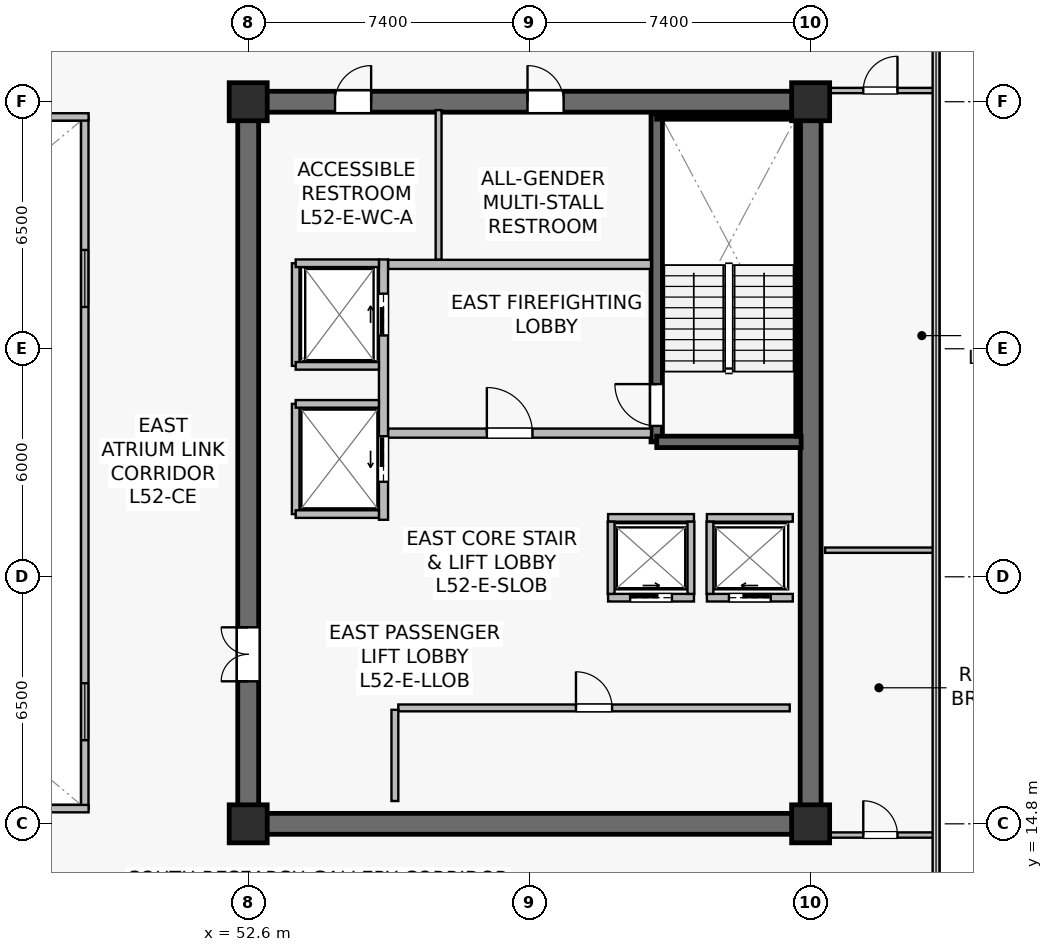
"""IFC4 building model, lengths in metres.
Left out: names, types, materials, properties, quantities, classifications, styles, units other than length and angle.
Written with IfcOpenShell. Run it as: python <this file> out.ifc"""

import sys

from ifc_helpers import new_model, si_unit, direction, frame, frame_2d, origin, origin_2d, place, context, subcontext, project, spatial, rectangle, extrude, source, transform, mapped, element, fill, save


model = new_model("IFC4")
c1 = context("Model", 3, precision=1e-05, world=origin(), true_north=direction((0.0, 1.0)))
c2 = subcontext(c1, "Body", "Model", "MODEL_VIEW")
j1 = project(units=[si_unit("LENGTHUNIT", "METRE"), si_unit("PLANEANGLEUNIT", "RADIAN")], contexts=[c1])
p1 = place(None, origin())
s1 = spatial("IfcSite", under=j1, at=p1, CompositionType="ELEMENT")
p2 = place(p1, origin())
s2 = spatial("IfcBuilding", under=s1, at=p2, CompositionType="ELEMENT")
p3 = place(p2, frame((0.0, 0.0, 217.8)))
s3 = spatial("IfcBuildingStorey", under=s2, at=p3, CompositionType="ELEMENT", Elevation=217.8)
p4 = place(p3, frame((52.325, 14.8, 0.0), z_axis=(0.0, 0.0, 1.0), x_axis=(1.0, 0.0, 0.0)))
e1 = element("IfcWall", 1, at=p4, inside=s3, PredefinedType="SHEAR", context=c2, shape_type="SweptSolid", body=[
    extrude(rectangle(XDim=15.35, YDim=0.55, at=frame_2d((7.675, 0.0))), origin(), (0.0, 0.0, 1.0), 3.8),
])
p5 = place(p3, frame((52.325, 33.8, 0.0), z_axis=(0.0, 0.0, 1.0), x_axis=(1.0, 0.0, 0.0)))
e2 = element("IfcWall", 2, at=p5, inside=s3, PredefinedType="SHEAR", context=c2, shape_type="SweptSolid", body=[
    extrude(rectangle(XDim=15.35, YDim=0.55, at=frame_2d((7.675, 0.0))), origin(), (0.0, 0.0, 1.0), 3.8),
])
p6 = place(p5, frame((7.625, 0.0, 0.0)))
e3 = element("IfcOpeningElement", 3, at=p6, cuts=e2, PredefinedType="OPENING", context=c2, shape_type="SweptSolid", body=[
    extrude(rectangle(XDim=0.95, YDim=2.15, at=frame_2d((0.475, 1.075))), frame((0.0, 0.285, 0.0), z_axis=(0.0, -1.0, 0.0), x_axis=(1.0, 0.0, 0.0)), (0.0, 0.0, 1.0), 0.57),
])
p7 = place(p5, frame((2.56, 0.0, 0.0)))
e4 = element("IfcOpeningElement", 4, at=p7, cuts=e2, PredefinedType="OPENING", context=c2, shape_type="SweptSolid", body=[
    extrude(rectangle(XDim=0.95, YDim=2.15, at=frame_2d((0.475, 1.075))), frame((0.0, 0.285, 0.0), z_axis=(0.0, -1.0, 0.0), x_axis=(1.0, 0.0, 0.0)), (0.0, 0.0, 1.0), 0.57),
])
p8 = place(p3, frame((52.6, 15.075, 0.0), z_axis=(0.0, 0.0, 1.0), x_axis=(0.0, 1.0, 0.0)))
e5 = element("IfcWall", 5, at=p8, inside=s3, PredefinedType="SHEAR", context=c2, shape_type="SweptSolid", body=[
    extrude(rectangle(XDim=18.45, YDim=0.55, at=frame_2d((9.225, 0.0))), origin(), (0.0, 0.0, 1.0), 3.8),
])
p9 = place(p8, frame((3.475, 0.0, 0.0)))
e6 = element("IfcOpeningElement", 6, at=p9, cuts=e5, PredefinedType="OPENING", context=c2, shape_type="SweptSolid", body=[
    extrude(rectangle(XDim=1.42, YDim=2.2, at=frame_2d((0.71, 1.1))), frame((0.0, 0.285, 0.0), z_axis=(0.0, -1.0, 0.0), x_axis=(1.0, 0.0, 0.0)), (0.0, 0.0, 1.0), 0.57),
])
p10 = place(p3, frame((67.4, 15.075, 0.0), z_axis=(0.0, 0.0, 1.0), x_axis=(0.0, 1.0, 0.0)))
e7 = element("IfcWall", 7, at=p10, inside=s3, PredefinedType="SHEAR", context=c2, shape_type="SweptSolid", body=[
    extrude(rectangle(XDim=18.45, YDim=0.55, at=frame_2d((9.225, 0.0))), origin(), (0.0, 0.0, 1.0), 3.8),
])
p11 = place(p3, frame((63.35, 24.85, 0.0), z_axis=(0.0, 0.0, 1.0), x_axis=(0.0, 1.0, 0.0)))
e8 = element("IfcWall", 8, at=p11, inside=s3, PredefinedType="SHEAR", context=c2, shape_type="SweptSolid", body=[
    extrude(rectangle(XDim=8.63, YDim=0.3, at=frame_2d((4.315, 0.0))), origin(), (0.0, 0.0, 1.0), 3.8),
])
p12 = place(p11, frame((0.42, 0.0, 0.0)))
e9 = element("IfcOpeningElement", 9, at=p12, cuts=e8, PredefinedType="OPENING", context=c2, shape_type="SweptSolid", body=[
    extrude(rectangle(XDim=1.1, YDim=2.15, at=frame_2d((0.55, 1.075))), frame((0.0, 0.16, 0.0), z_axis=(0.0, -1.0, 0.0), x_axis=(1.0, 0.0, 0.0)), (0.0, 0.0, 1.0), 0.32),
])
p13 = place(p3, frame((63.35, 24.85, 0.0), z_axis=(0.0, 0.0, 1.0), x_axis=(1.0, 0.0, 0.0)))
e10 = element("IfcWall", 10, at=p13, inside=s3, PredefinedType="SHEAR", context=c2, shape_type="SweptSolid", body=[
    extrude(rectangle(XDim=3.8, YDim=0.3, at=frame_2d((1.9, 0.0))), origin(), (0.0, 0.0, 1.0), 3.8),
])
p14 = place(p3, frame((63.35, 33.4, 0.0), z_axis=(0.0, 0.0, 1.0), x_axis=(1.0, 0.0, 0.0)))
e11 = element("IfcWall", 11, at=p14, inside=s3, PredefinedType="SOLIDWALL", context=c2, shape_type="SweptSolid", body=[
    extrude(rectangle(XDim=3.72, YDim=0.12, at=frame_2d((1.86, 0.0))), origin(), (0.0, 0.0, 1.0), 3.8),
])
p15 = place(p3, frame((67.07, 25.0, 0.0), z_axis=(0.0, 0.0, 1.0), x_axis=(0.0, 1.0, 0.0)))
e12 = element("IfcWall", 12, at=p15, inside=s3, PredefinedType="SOLIDWALL", context=c2, shape_type="SweptSolid", body=[
    extrude(rectangle(XDim=8.32, YDim=0.12, at=frame_2d((4.16, 0.0))), origin(), (0.0, 0.0, 1.0), 3.8),
])
m1 = source(origin(), c2, "Body", "SweptSolid", [
    extrude(rectangle(XDim=1.0, YDim=1.0, at=origin_2d()), origin(), (0.0, 0.0, 1.0), 4.1),
])
for number, where, z_axis, x_axis in (
    (13, (52.6, 14.8, 0.0), (0.0, 0.0, 1.0), (1.0, 0.0, 0.0)),
    (14, (67.4, 14.8, 0.0), (0.0, 0.0, 1.0), (1.0, 0.0, 0.0)),
    (15, (52.6, 33.8, 0.0), (0.0, 0.0, 1.0), (1.0, 0.0, 0.0)),
    (16, (67.4, 33.8, 0.0), (0.0, 0.0, 1.0), (1.0, 0.0, 0.0)),
):
    element("IfcColumn", number, at=place(p3, frame(where, z_axis=z_axis, x_axis=x_axis)), inside=s3, PredefinedType="COLUMN", context=c2, shape_type="MappedRepresentation", body=[
        mapped(m1, transform((0.0, 0.0, 0.0), scale=1.0)),
    ])
p16 = place(p3, frame((56.28, 25.08, 0.0), z_axis=(0.0, 0.0, 1.0), x_axis=(1.0, 0.0, 0.0)))
e17 = element("IfcWall", 17, at=p16, inside=s3, PredefinedType="SOLIDWALL", context=c2, shape_type="SweptSolid", body=[
    extrude(rectangle(XDim=6.92, YDim=0.24, at=frame_2d((3.46, 0.0))), origin(), (0.0, 0.0, 1.0), 3.197),
])
p17 = place(p16, frame((2.6, 0.0, 0.0)))
e18 = element("IfcOpeningElement", 18, at=p17, cuts=e17, PredefinedType="OPENING", context=c2, shape_type="SweptSolid", body=[
    extrude(rectangle(XDim=1.2, YDim=2.16, at=frame_2d((0.6, 1.08))), frame((0.0, 0.13, 0.0), z_axis=(0.0, -1.0, 0.0), x_axis=(1.0, 0.0, 0.0)), (0.0, 0.0, 1.0), 0.26),
])
p18 = place(p3, frame((56.28, 29.52, 0.0), z_axis=(0.0, 0.0, 1.0), x_axis=(1.0, 0.0, 0.0)))
e19 = element("IfcWall", 19, at=p18, inside=s3, PredefinedType="SOLIDWALL", context=c2, shape_type="SweptSolid", body=[
    extrude(rectangle(XDim=6.92, YDim=0.24, at=frame_2d((3.46, 0.0))), origin(), (0.0, 0.0, 1.0), 3.197),
])
p19 = place(p3, frame((56.16, 22.8, 0.0), z_axis=(0.0, 0.0, 1.0), x_axis=(0.0, 1.0, 0.0)))
e20 = element("IfcWall", 20, at=p19, inside=s3, PredefinedType="SOLIDWALL", context=c2, shape_type="SweptSolid", body=[
    extrude(rectangle(XDim=6.85, YDim=0.24, at=frame_2d((3.425, 0.0))), origin(), (0.0, 0.0, 1.0), 2.935),
])
p20 = place(p19, frame((4.85, 0.0, 0.0)))
e21 = element("IfcOpeningElement", 21, at=p20, cuts=e20, PredefinedType="OPENING", context=c2, shape_type="SweptSolid", body=[
    extrude(rectangle(XDim=1.1, YDim=2.22, at=frame_2d((0.55, 1.11))), frame((0.0, 0.13, 0.0), z_axis=(0.0, -1.0, 0.0), x_axis=(1.0, 0.0, 0.0)), (0.0, 0.0, 1.0), 0.26),
])
p21 = place(p19, frame((1.0, 0.0, 0.0)))
e22 = element("IfcOpeningElement", 22, at=p21, cuts=e20, PredefinedType="OPENING", context=c2, shape_type="SweptSolid", body=[
    extrude(rectangle(XDim=1.2, YDim=2.22, at=frame_2d((0.6, 1.11))), frame((0.0, 0.13, 0.0), z_axis=(0.0, -1.0, 0.0), x_axis=(1.0, 0.0, 0.0)), (0.0, 0.0, 1.0), 0.26),
])
p22 = place(p3, frame((64.67, 20.75, 0.0), z_axis=(0.0, 0.0, 1.0), x_axis=(1.0, 0.0, 0.0)))
e23 = element("IfcWall", 23, at=p22, inside=s3, PredefinedType="SOLIDWALL", context=c2, shape_type="SweptSolid", body=[
    extrude(rectangle(XDim=2.26, YDim=0.2, at=frame_2d((1.13, 0.0))), origin(), (0.0, 0.0, 1.0), 3.8),
])
p23 = place(p22, frame((0.58, 0.0, 0.0)))
e24 = element("IfcOpeningElement", 24, at=p23, cuts=e23, PredefinedType="OPENING", context=c2, shape_type="SweptSolid", body=[
    extrude(rectangle(XDim=1.1, YDim=2.22, at=frame_2d((0.55, 1.11))), frame((0.0, 0.11, 0.0), z_axis=(0.0, -1.0, 0.0), x_axis=(1.0, 0.0, 0.0)), (0.0, 0.0, 1.0), 0.22),
])
p24 = place(p3, frame((64.67, 22.85, 0.0), z_axis=(0.0, 0.0, 1.0), x_axis=(1.0, 0.0, 0.0)))
e25 = element("IfcWall", 25, at=p24, inside=s3, PredefinedType="SOLIDWALL", context=c2, shape_type="SweptSolid", body=[
    extrude(rectangle(XDim=2.26, YDim=0.2, at=frame_2d((1.13, 0.0))), origin(), (0.0, 0.0, 1.0), 3.8),
])
p25 = place(p3, frame((64.75, 20.85, 0.0), z_axis=(0.0, 0.0, 1.0), x_axis=(0.0, 1.0, 0.0)))
e26 = element("IfcWall", 26, at=p25, inside=s3, PredefinedType="SOLIDWALL", context=c2, shape_type="SweptSolid", body=[
    extrude(rectangle(XDim=1.9, YDim=0.18, at=frame_2d((0.95, 0.0))), origin(), (0.0, 0.0, 1.0), 3.8),
])
p26 = place(p3, frame((62.07, 20.75, 0.0), z_axis=(0.0, 0.0, 1.0), x_axis=(1.0, 0.0, 0.0)))
e27 = element("IfcWall", 27, at=p26, inside=s3, PredefinedType="SOLIDWALL", context=c2, shape_type="SweptSolid", body=[
    extrude(rectangle(XDim=2.26, YDim=0.2, at=frame_2d((1.13, 0.0))), origin(), (0.0, 0.0, 1.0), 3.8),
])
p27 = place(p26, frame((0.58, 0.0, 0.0)))
e28 = element("IfcOpeningElement", 28, at=p27, cuts=e27, PredefinedType="OPENING", context=c2, shape_type="SweptSolid", body=[
    extrude(rectangle(XDim=1.1, YDim=2.22, at=frame_2d((0.55, 1.11))), frame((0.0, 0.11, 0.0), z_axis=(0.0, -1.0, 0.0), x_axis=(1.0, 0.0, 0.0)), (0.0, 0.0, 1.0), 0.22),
])
p28 = place(p3, frame((62.07, 22.85, 0.0), z_axis=(0.0, 0.0, 1.0), x_axis=(1.0, 0.0, 0.0)))
e29 = element("IfcWall", 29, at=p28, inside=s3, PredefinedType="SOLIDWALL", context=c2, shape_type="SweptSolid", body=[
    extrude(rectangle(XDim=2.26, YDim=0.2, at=frame_2d((1.13, 0.0))), origin(), (0.0, 0.0, 1.0), 3.8),
])
for number, where, z_axis, x_axis in (
    (30, (62.15, 20.85, 0.0), (0.0, 0.0, 1.0), (0.0, 1.0, 0.0)),
    (31, (64.25, 20.85, 0.0), (0.0, 0.0, 1.0), (0.0, 1.0, 0.0)),
):
    element("IfcWall", number, at=place(p3, frame(where, z_axis=z_axis, x_axis=x_axis)), inside=s3, PredefinedType="SOLIDWALL", context=c2, shape_type="SweptSolid", body=[
        extrude(rectangle(XDim=1.9, YDim=0.18, at=frame_2d((0.95, 0.0))), origin(), (0.0, 0.0, 1.0), 3.8),
    ])
p29 = place(p3, frame((53.85, 26.85, 0.0), z_axis=(0.0, 0.0, 1.0), x_axis=(0.0, 1.0, 0.0)))
e32 = element("IfcWall", 32, at=p29, inside=s3, PredefinedType="SOLIDWALL", context=c2, shape_type="SweptSolid", body=[
    extrude(rectangle(XDim=2.7, YDim=0.2, at=frame_2d((1.35, 0.0))), origin(), (0.0, 0.0, 1.0), 3.8),
])
p30 = place(p3, frame((53.85, 29.55, 0.0), z_axis=(0.0, 0.0, 1.0), x_axis=(1.0, 0.0, 0.0)))
e33 = element("IfcWall", 33, at=p30, inside=s3, PredefinedType="SOLIDWALL", context=c2, shape_type="SweptSolid", body=[
    extrude(rectangle(XDim=2.19, YDim=0.2, at=frame_2d((1.095, 0.0))), origin(), (0.0, 0.0, 1.0), 3.8),
])
p31 = place(p3, frame((53.85, 26.85, 0.0), z_axis=(0.0, 0.0, 1.0), x_axis=(1.0, 0.0, 0.0)))
e34 = element("IfcWall", 34, at=p31, inside=s3, PredefinedType="SOLIDWALL", context=c2, shape_type="SweptSolid", body=[
    extrude(rectangle(XDim=2.19, YDim=0.2, at=frame_2d((1.095, 0.0))), origin(), (0.0, 0.0, 1.0), 3.197),
])
p32 = place(p3, frame((53.85, 22.95, 0.0), z_axis=(0.0, 0.0, 1.0), x_axis=(0.0, 1.0, 0.0)))
e35 = element("IfcWall", 35, at=p32, inside=s3, PredefinedType="SOLIDWALL", context=c2, shape_type="SweptSolid", body=[
    extrude(rectangle(XDim=2.9, YDim=0.2, at=frame_2d((1.45, 0.0))), origin(), (0.0, 0.0, 1.0), 2.935),
])
for number, where, z_axis, x_axis in (
    (36, (53.85, 25.85, 0.0), (0.0, 0.0, 1.0), (1.0, 0.0, 0.0)),
    (37, (53.85, 22.95, 0.0), (0.0, 0.0, 1.0), (1.0, 0.0, 0.0)),
):
    element("IfcWall", number, at=place(p3, frame(where, z_axis=z_axis, x_axis=x_axis)), inside=s3, PredefinedType="SOLIDWALL", context=c2, shape_type="SweptSolid", body=[
        extrude(rectangle(XDim=2.19, YDim=0.2, at=frame_2d((1.095, 0.0))), origin(), (0.0, 0.0, 1.0), 3.8),
    ])
p33 = place(p3, frame((56.55, 17.85, 0.0), z_axis=(0.0, 0.0, 1.0), x_axis=(1.0, 0.0, 0.0)))
e38 = element("IfcWall", 38, at=p33, inside=s3, PredefinedType="SOLIDWALL", context=c2, shape_type="SweptSolid", body=[
    extrude(rectangle(XDim=10.3, YDim=0.18, at=frame_2d((5.15, 0.0))), origin(), (0.0, 0.0, 1.0), 3.197),
])
p34 = place(p33, frame((4.675, 0.0, 0.0)))
e39 = element("IfcOpeningElement", 39, at=p34, cuts=e38, PredefinedType="OPENING", context=c2, shape_type="SweptSolid", body=[
    extrude(rectangle(XDim=0.95, YDim=2.15, at=frame_2d((0.475, 1.075))), frame((0.0, 0.1, 0.0), z_axis=(0.0, -1.0, 0.0), x_axis=(1.0, 0.0, 0.0)), (0.0, 0.0, 1.0), 0.2),
])
p35 = place(p3, frame((56.46, 15.4, 0.0), z_axis=(0.0, 0.0, 1.0), x_axis=(0.0, 1.0, 0.0)))
e40 = element("IfcWall", 40, at=p35, inside=s3, PredefinedType="SOLIDWALL", context=c2, shape_type="SweptSolid", body=[
    extrude(rectangle(XDim=2.4, YDim=0.18, at=frame_2d((1.2, 0.0))), origin(), (0.0, 0.0, 1.0), 3.8),
])
p36 = place(p3, frame((57.61, 29.65, 0.0), z_axis=(0.0, 0.0, 1.0), x_axis=(0.0, 1.0, 0.0)))
e41 = element("IfcWall", 41, at=p36, inside=s3, PredefinedType="PLUMBINGWALL", context=c2, shape_type="SweptSolid", body=[
    extrude(rectangle(XDim=3.93, YDim=0.155, at=frame_2d((1.965, 0.0))), origin(), (0.0, 0.0, 1.0), 3.8),
])
p37 = place(p3, frame((48.3, 15.2, 0.0), z_axis=(0.0, 0.0, 1.0), x_axis=(0.0, 1.0, 0.0)))
e42 = element("IfcWall", 42, at=p37, inside=s3, PredefinedType="SOLIDWALL", context=c2, shape_type="SweptSolid", body=[
    extrude(rectangle(XDim=18.2, YDim=0.195, at=frame_2d((9.1, 0.0))), origin(), (0.0, 0.0, 1.0), 3.8),
])
p38 = place(p37, frame((1.8, 0.0, 0.9)))
e43 = element("IfcOpeningElement", 43, at=p38, cuts=e42, PredefinedType="OPENING", context=c2, shape_type="SweptSolid", body=[
    extrude(rectangle(XDim=1.5, YDim=1.4, at=frame_2d((0.75, 0.7))), frame((0.0, 0.107, 0.0), z_axis=(0.0, -1.0, 0.0), x_axis=(1.0, 0.0, 0.0)), (0.0, 0.0, 1.0), 0.215),
])
p39 = place(p37, frame((13.2, 0.0, 0.9)))
e44 = element("IfcOpeningElement", 44, at=p39, cuts=e42, PredefinedType="OPENING", context=c2, shape_type="SweptSolid", body=[
    extrude(rectangle(XDim=1.5, YDim=1.4, at=frame_2d((0.75, 0.7))), frame((0.0, 0.107, 0.0), z_axis=(0.0, -1.0, 0.0), x_axis=(1.0, 0.0, 0.0)), (0.0, 0.0, 1.0), 0.215),
])
for number, where, z_axis, x_axis in (
    (45, (26.4, 15.2, 0.0), (0.0, 0.0, 1.0), (1.0, 0.0, 0.0)),
    (46, (26.4, 33.4, 0.0), (0.0, 0.0, 1.0), (1.0, 0.0, 0.0)),
):
    element("IfcWall", number, at=place(p3, frame(where, z_axis=z_axis, x_axis=x_axis)), inside=s3, PredefinedType="SOLIDWALL", context=c2, shape_type="SweptSolid", body=[
        extrude(rectangle(XDim=22.0, YDim=0.195, at=frame_2d((11.0, 0.0))), origin(), (0.0, 0.0, 1.0), 3.8),
    ])
p40 = place(p3, frame((67.78, 22.0, 0.0), z_axis=(0.0, 0.0, 1.0), x_axis=(1.0, 0.0, 0.0)))
e47 = element("IfcWall", 47, at=p40, inside=s3, PredefinedType="PARTITIONING", context=c2, shape_type="SweptSolid", body=[
    extrude(rectangle(XDim=2.91, YDim=0.14, at=frame_2d((1.455, 0.0))), origin(), (0.0, 0.0, 1.0), 3.8),
])
p41 = place(p3, frame((67.78, 14.505, 0.0), z_axis=(0.0, 0.0, 1.0), x_axis=(1.0, 0.0, 0.0)))
e48 = element("IfcWall", 48, at=p41, inside=s3, PredefinedType="PARTITIONING", context=c2, shape_type="SweptSolid", body=[
    extrude(rectangle(XDim=2.91, YDim=0.14, at=frame_2d((1.455, 0.0))), origin(), (0.0, 0.0, 1.0), 3.8),
])
p42 = place(p41, frame((1.005, 0.0, 0.0)))
e49 = element("IfcOpeningElement", 49, at=p42, cuts=e48, PredefinedType="OPENING", context=c2, shape_type="SweptSolid", body=[
    extrude(rectangle(XDim=0.9, YDim=2.1, at=frame_2d((0.45, 1.05))), frame((0.0, 0.08, 0.0), z_axis=(0.0, -1.0, 0.0), x_axis=(1.0, 0.0, 0.0)), (0.0, 0.0, 1.0), 0.16),
])
p43 = place(p3, frame((67.78, 34.095, 0.0), z_axis=(0.0, 0.0, 1.0), x_axis=(1.0, 0.0, 0.0)))
e50 = element("IfcWall", 50, at=p43, inside=s3, PredefinedType="PARTITIONING", context=c2, shape_type="SweptSolid", body=[
    extrude(rectangle(XDim=2.91, YDim=0.14, at=frame_2d((1.455, 0.0))), origin(), (0.0, 0.0, 1.0), 3.8),
])
p44 = place(p43, frame((1.005, 0.0, 0.0)))
e51 = element("IfcOpeningElement", 51, at=p44, cuts=e50, PredefinedType="OPENING", context=c2, shape_type="SweptSolid", body=[
    extrude(rectangle(XDim=0.9, YDim=2.1, at=frame_2d((0.45, 1.05))), frame((0.0, 0.08, 0.0), z_axis=(0.0, -1.0, 0.0), x_axis=(1.0, 0.0, 0.0)), (0.0, 0.0, 1.0), 0.16),
])
m2 = source(origin(), c2, "Body", "SweptSolid", [
    extrude(rectangle(XDim=1.5, YDim=1.4, at=frame_2d((0.75, 0.7))), frame((0.0, 0.03, 0.0), z_axis=(0.0, -1.0, 0.0), x_axis=(1.0, 0.0, 0.0)), (0.0, 0.0, 1.0), 0.06),
])
p45 = place(p38, origin())
e52 = element("IfcWindow", 52, at=p45, inside=s3, PartitioningType="SINGLE_PANEL", PredefinedType="WINDOW", context=c2, shape_type="MappedRepresentation", body=[
    mapped(m2, transform((0.0, 0.0, 0.0), scale=1.0)),
])
fill(e43, e52)
p46 = place(p39, origin())
e53 = element("IfcWindow", 53, at=p46, inside=s3, PartitioningType="SINGLE_PANEL", PredefinedType="WINDOW", context=c2, shape_type="MappedRepresentation", body=[
    mapped(m2, transform((0.0, 0.0, 0.0), scale=1.0)),
])
fill(e44, e53)
m3 = source(origin(), c2, "Body", "SweptSolid", [
    extrude(rectangle(XDim=1.1, YDim=2.15, at=frame_2d((0.55, 1.075))), frame((0.0, 0.025, 0.0), z_axis=(0.0, -1.0, 0.0), x_axis=(1.0, 0.0, 0.0)), (0.0, 0.0, 1.0), 0.05),
])
p47 = place(p12, origin())
e54 = element("IfcDoor", 54, at=p47, inside=s3, OperationType="SINGLE_SWING_RIGHT", PredefinedType="DOOR", context=c2, shape_type="MappedRepresentation", body=[
    mapped(m3, transform((0.0, 0.0, 0.0), scale=1.0)),
])
fill(e9, e54)
m4 = source(origin(), c2, "Body", "SweptSolid", [
    extrude(rectangle(XDim=1.2, YDim=2.16, at=frame_2d((0.6, 1.08))), frame((0.0, 0.025, 0.0), z_axis=(0.0, -1.0, 0.0), x_axis=(1.0, 0.0, 0.0)), (0.0, 0.0, 1.0), 0.05),
])
p48 = place(p17, origin())
e55 = element("IfcDoor", 55, at=p48, inside=s3, OperationType="SINGLE_SWING_LEFT", PredefinedType="DOOR", context=c2, shape_type="MappedRepresentation", body=[
    mapped(m4, transform((0.0, 0.0, 0.0), scale=1.0)),
])
fill(e18, e55)
m5 = source(origin(), c2, "Body", "SweptSolid", [
    extrude(rectangle(XDim=1.1, YDim=2.22, at=frame_2d((0.55, 1.11))), frame((0.0, 0.025, 0.0), z_axis=(0.0, -1.0, 0.0), x_axis=(1.0, 0.0, 0.0)), (0.0, 0.0, 1.0), 0.05),
])
p49 = place(p23, origin())
e56 = element("IfcDoor", 56, at=p49, inside=s3, OperationType="SLIDING_TO_LEFT", PredefinedType="USERDEFINED", context=c2, shape_type="MappedRepresentation", body=[
    mapped(m5, transform((0.0, 0.0, 0.0), scale=1.0)),
])
fill(e24, e56)
p50 = place(p27, origin())
e57 = element("IfcDoor", 57, at=p50, inside=s3, OperationType="SLIDING_TO_RIGHT", PredefinedType="USERDEFINED", context=c2, shape_type="MappedRepresentation", body=[
    mapped(m5, transform((0.0, 0.0, 0.0), scale=1.0)),
])
fill(e28, e57)
p51 = place(p20, origin())
e58 = element("IfcDoor", 58, at=p51, inside=s3, OperationType="SLIDING_TO_RIGHT", PredefinedType="USERDEFINED", context=c2, shape_type="MappedRepresentation", body=[
    mapped(m5, transform((0.0, 0.0, 0.0), scale=1.0)),
])
fill(e21, e58)
m6 = source(origin(), c2, "Body", "SweptSolid", [
    extrude(rectangle(XDim=1.2, YDim=2.22, at=frame_2d((0.6, 1.11))), frame((0.0, 0.025, 0.0), z_axis=(0.0, -1.0, 0.0), x_axis=(1.0, 0.0, 0.0)), (0.0, 0.0, 1.0), 0.05),
])
p52 = place(p21, origin())
e59 = element("IfcDoor", 59, at=p52, inside=s3, OperationType="SLIDING_TO_LEFT", PredefinedType="USERDEFINED", context=c2, shape_type="MappedRepresentation", body=[
    mapped(m6, transform((0.0, 0.0, 0.0), scale=1.0)),
])
fill(e22, e59)
m7 = source(origin(), c2, "Body", "SweptSolid", [
    extrude(rectangle(XDim=0.95, YDim=2.15, at=frame_2d((0.475, 1.075))), frame((0.0, 0.025, 0.0), z_axis=(0.0, -1.0, 0.0), x_axis=(1.0, 0.0, 0.0)), (0.0, 0.0, 1.0), 0.05),
])
p53 = place(p34, origin())
e60 = element("IfcDoor", 60, at=p53, inside=s3, OperationType="SINGLE_SWING_LEFT", PredefinedType="DOOR", context=c2, shape_type="MappedRepresentation", body=[
    mapped(m7, transform((0.0, 0.0, 0.0), scale=1.0)),
])
fill(e39, e60)
m8 = source(origin(), c2, "Body", "SweptSolid", [
    extrude(rectangle(XDim=1.42, YDim=2.2, at=frame_2d((0.71, 1.1))), frame((0.0, 0.025, 0.0), z_axis=(0.0, -1.0, 0.0), x_axis=(1.0, 0.0, 0.0)), (0.0, 0.0, 1.0), 0.05),
])
p54 = place(p9, origin())
e61 = element("IfcDoor", 61, at=p54, inside=s3, OperationType="DOUBLE_DOOR_SINGLE_SWING", PredefinedType="DOOR", context=c2, shape_type="MappedRepresentation", body=[
    mapped(m8, transform((0.0, 0.0, 0.0), scale=1.0)),
])
fill(e6, e61)
p55 = place(p6, origin())
e62 = element("IfcDoor", 62, at=p55, inside=s3, OperationType="SINGLE_SWING_LEFT", PredefinedType="DOOR", context=c2, shape_type="MappedRepresentation", body=[
    mapped(m7, transform((0.0, 0.0, 0.0), scale=1.0)),
])
fill(e3, e62)
p56 = place(p7, origin())
e63 = element("IfcDoor", 63, at=p56, inside=s3, OperationType="SINGLE_SWING_RIGHT", PredefinedType="DOOR", context=c2, shape_type="MappedRepresentation", body=[
    mapped(m7, transform((0.0, 0.0, 0.0), scale=1.0)),
])
fill(e4, e63)
m9 = source(origin(), c2, "Body", "SweptSolid", [
    extrude(rectangle(XDim=0.9, YDim=2.1, at=frame_2d((0.45, 1.05))), frame((0.0, 0.025, 0.0), z_axis=(0.0, -1.0, 0.0), x_axis=(1.0, 0.0, 0.0)), (0.0, 0.0, 1.0), 0.05),
])
p57 = place(p42, origin())
e64 = element("IfcDoor", 64, at=p57, inside=s3, OperationType="SINGLE_SWING_LEFT", PredefinedType="DOOR", context=c2, shape_type="MappedRepresentation", body=[
    mapped(m9, transform((0.0, 0.0, 0.0), scale=1.0)),
])
fill(e49, e64)
p58 = place(p44, origin())
e65 = element("IfcDoor", 65, at=p58, inside=s3, OperationType="SINGLE_SWING_RIGHT", PredefinedType="DOOR", context=c2, shape_type="MappedRepresentation", body=[
    mapped(m9, transform((0.0, 0.0, 0.0), scale=1.0)),
])
fill(e51, e65)
save(model, sys.argv[1])
